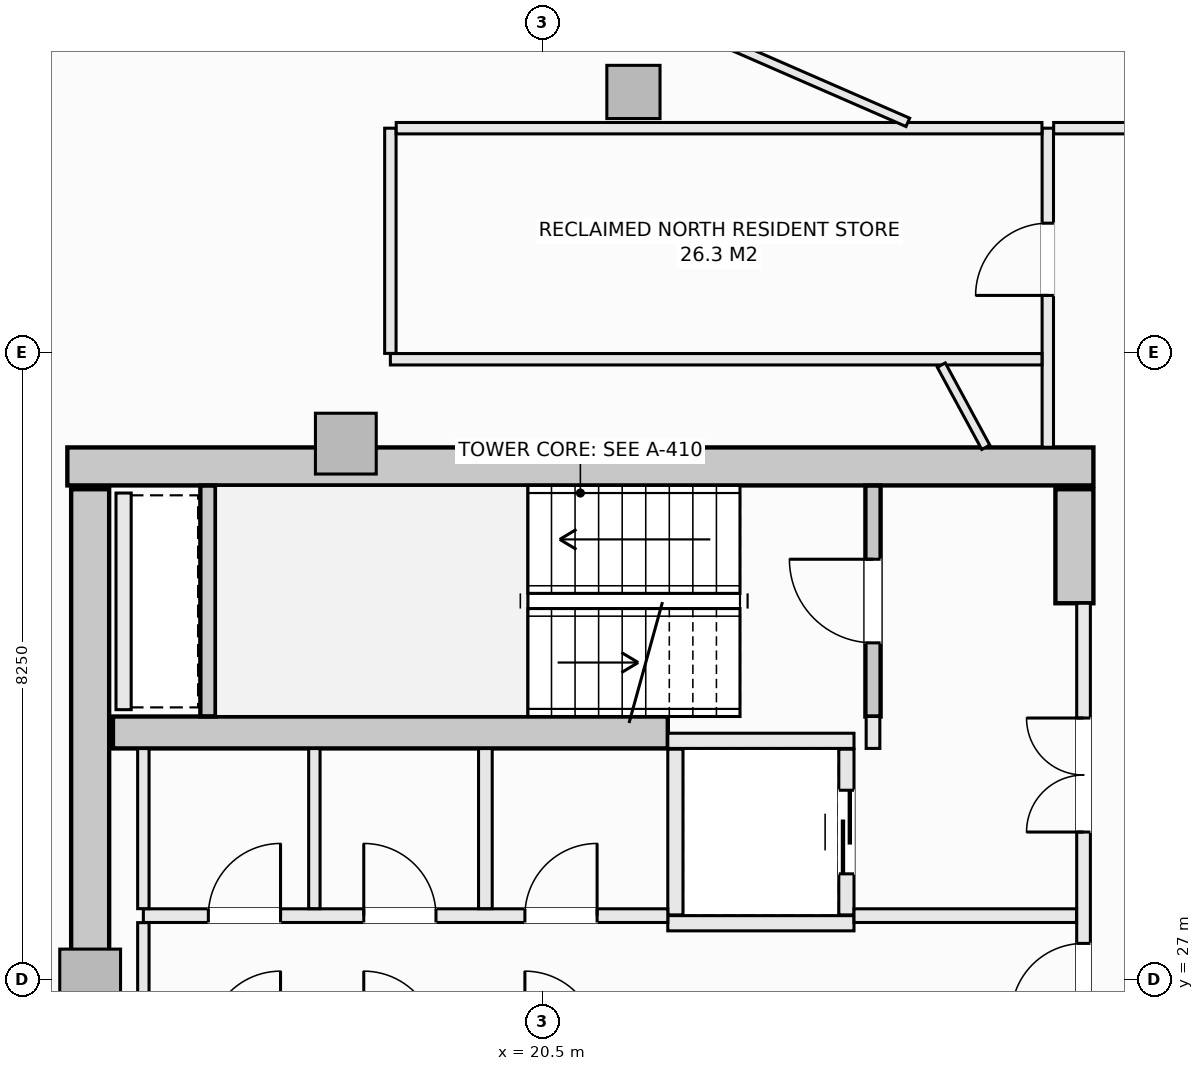
"""IFC4 building model, lengths in metres.
Left out: names, types, materials, properties, quantities, classifications, styles, units other than length and angle.
Written with IfcOpenShell. Run it as: python <this file> out.ifc"""

import sys

from ifc_helpers import new_model, si_unit, direction, frame, frame_2d, origin, origin_2d, place, context, subcontext, project, spatial, rectangle, extrude, element, fill, save


model = new_model("IFC4")
c1 = context("Model", 3, precision=1e-05, world=origin(), true_north=direction((0.0, 1.0)))
c2 = subcontext(c1, "Body", "Model", "MODEL_VIEW")
j1 = project(units=[si_unit("LENGTHUNIT", "METRE"), si_unit("PLANEANGLEUNIT", "RADIAN")], contexts=[c1])
p1 = place(None, origin())
s1 = spatial("IfcSite", under=j1, at=p1, CompositionType="ELEMENT")
p2 = place(p1, origin())
s2 = spatial("IfcBuilding", under=s1, at=p2, CompositionType="ELEMENT")
p3 = place(p2, frame((0.0, 0.0, 232.7)))
s3 = spatial("IfcBuildingStorey", under=s2, at=p3, CompositionType="ELEMENT", Elevation=232.7)
p4 = place(p3, frame((14.25, 33.75, -0.27), z_axis=(0.0, 0.0, 1.0), x_axis=(1.0, 0.0, 0.0)))
e1 = element("IfcWall", 1, at=p4, inside=s3, PredefinedType="SHEAR", context=c2, shape_type="SweptSolid", body=[
    extrude(rectangle(XDim=13.5, YDim=0.5, at=frame_2d((6.75, 0.0))), origin(), (0.0, 0.0, 1.0), 3.3),
])
p5 = place(p3, frame((14.55, 20.55, -0.27), z_axis=(0.0, 0.0, 1.0), x_axis=(0.0, 1.0, 0.0)))
e2 = element("IfcWall", 2, at=p5, inside=s3, PredefinedType="SHEAR", context=c2, shape_type="SweptSolid", body=[
    extrude(rectangle(XDim=12.9, YDim=0.5, at=frame_2d((6.45, 0.0))), origin(), (0.0, 0.0, 1.0), 3.3),
])
p6 = place(p3, frame((27.5, 31.95, -0.27), z_axis=(0.0, 0.0, 1.0), x_axis=(0.0, 1.0, 0.0)))
e3 = element("IfcWall", 3, at=p6, inside=s3, PredefinedType="SHEAR", context=c2, shape_type="SweptSolid", body=[
    extrude(rectangle(XDim=1.5, YDim=0.5, at=frame_2d((0.75, 0.0))), origin(), (0.0, 0.0, 1.0), 3.3),
])
p7 = place(p3, frame((14.85, 30.25, -0.27), z_axis=(0.0, 0.0, 1.0), x_axis=(1.0, 0.0, 0.0)))
e4 = element("IfcWall", 4, at=p7, inside=s3, PredefinedType="SHEAR", context=c2, shape_type="SweptSolid", body=[
    extrude(rectangle(XDim=7.3, YDim=0.42, at=frame_2d((3.65, 0.0))), origin(), (0.0, 0.0, 1.0), 3.3),
])
p8 = place(p3, frame((21.698, 38.677, -0.27), z_axis=(0.0, 0.0, 1.0), x_axis=(1.0, 0.0, 0.0)))
e5 = element("IfcColumn", 5, at=p8, inside=s3, PredefinedType="COLUMN", context=c2, shape_type="SweptSolid", body=[
    extrude(rectangle(XDim=0.7, YDim=0.7, at=origin_2d()), origin(), (0.0, 0.0, 1.0), 3.3),
])
for number, where, z_axis, x_axis in (
    (6, (17.914, 34.05, -0.27), (0.0, 0.0, 1.0), (1.0, 0.0, 0.0)),
    (7, (14.55, 27.0, -0.27), (0.0, 0.0, 1.0), (1.0, 0.0, 0.0)),
):
    element("IfcColumn", number, at=place(p3, frame(where, z_axis=z_axis, x_axis=x_axis)), inside=s3, PredefinedType="PILASTER", context=c2, shape_type="SweptSolid", body=[
        extrude(rectangle(XDim=0.8, YDim=0.8, at=origin_2d()), origin(), (0.0, 0.0, 1.0), 3.3),
    ])
p9 = place(p3, frame((8.691, 36.9, 0.0), z_axis=(0.0, 0.0, 1.0), x_axis=(0.901348331142, 0.433094892545, 0.0)))
e8 = element("IfcWall", 8, at=p9, inside=s3, PredefinedType="SOLIDWALL", context=c2, shape_type="SweptSolid", body=[
    extrude(rectangle(XDim=6.021, YDim=0.3, at=frame_2d((3.01, 0.0))), origin(), (0.0, 0.0, 1.0), 2.605),
])
p10 = place(p9, frame((2.11, 0.0, 0.0)))
e9 = element("IfcOpeningElement", 9, at=p10, cuts=e8, PredefinedType="OPENING", context=c2, shape_type="SweptSolid", body=[
    extrude(rectangle(XDim=1.8, YDim=2.25, at=frame_2d((0.9, 1.125))), frame((0.0, 0.16, 0.0), z_axis=(0.0, -1.0, 0.0), x_axis=(1.0, 0.0, 0.0)), (0.0, 0.0, 1.0), 0.32),
])
p11 = place(p3, frame((24.85, 30.46, -0.27), z_axis=(0.0, 0.0, 1.0), x_axis=(0.0, 1.0, 0.0)))
e10 = element("IfcWall", 10, at=p11, inside=s3, PredefinedType="SHEAR", context=c2, shape_type="SweptSolid", body=[
    extrude(rectangle(XDim=3.038, YDim=0.2, at=frame_2d((1.519, 0.0))), origin(), (0.0, 0.0, 1.0), 3.3),
])
p12 = place(p11, frame((0.969, 0.0, 0.27)))
e11 = element("IfcOpeningElement", 11, at=p12, cuts=e10, PredefinedType="OPENING", context=c2, shape_type="SweptSolid", body=[
    extrude(rectangle(XDim=1.1, YDim=2.15, at=frame_2d((0.55, 1.075))), frame((0.0, 0.11, 0.0), z_axis=(0.0, -1.0, 0.0), x_axis=(1.0, 0.0, 0.0)), (0.0, 0.0, 1.0), 0.22),
])
p13 = place(p3, frame((16.1, 30.462, -0.27), z_axis=(0.0, 0.0, 1.0), x_axis=(0.0, 1.0, 0.0)))
e12 = element("IfcWall", 12, at=p13, inside=s3, PredefinedType="SHEAR", context=c2, shape_type="SweptSolid", body=[
    extrude(rectangle(XDim=3.036, YDim=0.2, at=frame_2d((1.518, 0.0))), origin(), (0.0, 0.0, 1.0), 3.3),
])
for number, where, z_axis, x_axis in (
    (13, (22.15, 30.14, 0.0), (0.0, 0.0, 1.0), (1.0, 0.0, 0.0)),
    (14, (22.15, 27.74, 0.0), (0.0, 0.0, 1.0), (1.0, 0.0, 0.0)),
):
    element("IfcWall", number, at=place(p3, frame(where, z_axis=z_axis, x_axis=x_axis)), inside=s3, PredefinedType="SOLIDWALL", context=c2, shape_type="SweptSolid", body=[
        extrude(rectangle(XDim=2.45, YDim=0.2, at=frame_2d((1.225, 0.0))), origin(), (0.0, 0.0, 1.0), 3.03),
    ])
p14 = place(p3, frame((22.25, 27.85, 0.0), z_axis=(0.0, 0.0, 1.0), x_axis=(0.0, 1.0, 0.0)))
e15 = element("IfcWall", 15, at=p14, inside=s3, PredefinedType="SOLIDWALL", context=c2, shape_type="SweptSolid", body=[
    extrude(rectangle(XDim=2.18, YDim=0.2, at=frame_2d((1.09, 0.0))), origin(), (0.0, 0.0, 1.0), 3.03),
])
p15 = place(p3, frame((24.5, 27.85, 0.0), z_axis=(0.0, 0.0, 1.0), x_axis=(0.0, 1.0, 0.0)))
e16 = element("IfcWall", 16, at=p15, inside=s3, PredefinedType="SOLIDWALL", context=c2, shape_type="SweptSolid", body=[
    extrude(rectangle(XDim=2.18, YDim=0.2, at=frame_2d((1.09, 0.0))), origin(), (0.0, 0.0, 1.0), 3.03),
])
p16 = place(p15, frame((0.54, 0.0, 0.0)))
e17 = element("IfcOpeningElement", 17, at=p16, cuts=e16, PredefinedType="OPENING", context=c2, shape_type="SweptSolid", body=[
    extrude(rectangle(XDim=1.1, YDim=2.2, at=frame_2d((0.55, 1.1))), frame((0.0, 0.11, 0.0), z_axis=(0.0, -1.0, 0.0), x_axis=(1.0, 0.0, 0.0)), (0.0, 0.0, 1.0), 0.22),
])
p17 = place(p3, frame((14.99, 30.55, 0.0), z_axis=(0.0, 0.0, 1.0), x_axis=(0.0, 1.0, 0.0)))
e18 = element("IfcWall", 18, at=p17, inside=s3, PredefinedType="SOLIDWALL", context=c2, shape_type="SweptSolid", body=[
    extrude(rectangle(XDim=2.85, YDim=0.2, at=frame_2d((1.425, 0.0))), origin(), (0.0, 0.0, 1.0), 3.03),
])
p18 = place(p3, frame((24.85, 30.04, 0.0), z_axis=(0.0, 0.0, 1.0), x_axis=(0.0, 1.0, 0.0)))
e19 = element("IfcWall", 19, at=p18, inside=s3, PredefinedType="SOLIDWALL", context=c2, shape_type="SweptSolid", body=[
    extrude(rectangle(XDim=0.42, YDim=0.18, at=frame_2d((0.21, 0.0))), origin(), (0.0, 0.0, 1.0), 3.03),
])
p19 = place(p3, frame((27.62, 22.05, 0.0), z_axis=(0.0, 0.0, 1.0), x_axis=(0.0, 1.0, 0.0)))
e20 = element("IfcWall", 20, at=p19, inside=s3, PredefinedType="SOLIDWALL", context=c2, shape_type="SweptSolid", body=[
    extrude(rectangle(XDim=9.9, YDim=0.18, at=frame_2d((4.95, 0.0))), origin(), (0.0, 0.0, 1.0), 3.03),
])
p20 = place(p19, frame((4.475, 0.0, 0.0)))
e21 = element("IfcOpeningElement", 21, at=p20, cuts=e20, PredefinedType="OPENING", context=c2, shape_type="SweptSolid", body=[
    extrude(rectangle(XDim=0.95, YDim=2.1, at=frame_2d((0.475, 1.05))), frame((0.0, 0.1, 0.0), z_axis=(0.0, -1.0, 0.0), x_axis=(1.0, 0.0, 0.0)), (0.0, 0.0, 1.0), 0.2),
])
p21 = place(p19, frame((6.89, 0.0, 0.0)))
e22 = element("IfcOpeningElement", 22, at=p21, cuts=e20, PredefinedType="OPENING", context=c2, shape_type="SweptSolid", body=[
    extrude(rectangle(XDim=1.5, YDim=2.2, at=frame_2d((0.75, 1.1))), frame((0.0, 0.1, 0.0), z_axis=(0.0, -1.0, 0.0), x_axis=(1.0, 0.0, 0.0)), (0.0, 0.0, 1.0), 0.2),
])
p22 = place(p19, frame((1.51, 0.0, 0.0)))
e23 = element("IfcOpeningElement", 23, at=p22, cuts=e20, PredefinedType="OPENING", context=c2, shape_type="SweptSolid", body=[
    extrude(rectangle(XDim=1.5, YDim=2.2, at=frame_2d((0.75, 1.1))), frame((0.0, 0.1, 0.0), z_axis=(0.0, -1.0, 0.0), x_axis=(1.0, 0.0, 0.0)), (0.0, 0.0, 1.0), 0.2),
])
p23 = place(p3, frame((15.25, 27.84, 0.0), z_axis=(0.0, 0.0, 1.0), x_axis=(1.0, 0.0, 0.0)))
e24 = element("IfcWall", 24, at=p23, inside=s3, PredefinedType="SOLIDWALL", context=c2, shape_type="SweptSolid", body=[
    extrude(rectangle(XDim=6.9, YDim=0.18, at=frame_2d((3.45, 0.0))), origin(), (0.0, 0.0, 1.0), 3.03),
])
p24 = place(p23, frame((5.02, 0.0, 0.0)))
e25 = element("IfcOpeningElement", 25, at=p24, cuts=e24, PredefinedType="OPENING", context=c2, shape_type="SweptSolid", body=[
    extrude(rectangle(XDim=0.95, YDim=2.1, at=frame_2d((0.475, 1.05))), frame((0.0, 0.1, 0.0), z_axis=(0.0, -1.0, 0.0), x_axis=(1.0, 0.0, 0.0)), (0.0, 0.0, 1.0), 0.2),
])
p25 = place(p23, frame((0.855, 0.0, 0.0)))
e26 = element("IfcOpeningElement", 26, at=p25, cuts=e24, PredefinedType="OPENING", context=c2, shape_type="SweptSolid", body=[
    extrude(rectangle(XDim=0.95, YDim=2.1, at=frame_2d((0.475, 1.05))), frame((0.0, 0.1, 0.0), z_axis=(0.0, -1.0, 0.0), x_axis=(1.0, 0.0, 0.0)), (0.0, 0.0, 1.0), 0.2),
])
p26 = place(p23, frame((2.9, 0.0, 0.0)))
e27 = element("IfcOpeningElement", 27, at=p26, cuts=e24, PredefinedType="OPENING", context=c2, shape_type="SweptSolid", body=[
    extrude(rectangle(XDim=0.95, YDim=2.1, at=frame_2d((0.475, 1.05))), frame((0.0, 0.1, 0.0), z_axis=(0.0, -1.0, 0.0), x_axis=(1.0, 0.0, 0.0)), (0.0, 0.0, 1.0), 0.2),
])
p27 = place(p3, frame((24.6, 27.84, 0.0), z_axis=(0.0, 0.0, 1.0), x_axis=(1.0, 0.0, 0.0)))
e28 = element("IfcWall", 28, at=p27, inside=s3, PredefinedType="SOLIDWALL", context=c2, shape_type="SweptSolid", body=[
    extrude(rectangle(XDim=2.928, YDim=0.18, at=frame_2d((1.464, 0.0))), origin(), (0.0, 0.0, 1.0), 3.03),
])
p28 = place(p3, frame((15.25, 26.252, 0.0), z_axis=(0.0, 0.0, 1.0), x_axis=(0.0, 1.0, 0.0)))
e29 = element("IfcWall", 29, at=p28, inside=s3, PredefinedType="PARTITIONING", context=c2, shape_type="SweptSolid", body=[
    extrude(rectangle(XDim=1.496, YDim=0.15, at=frame_2d((0.748, 0.0))), origin(), (0.0, 0.0, 1.0), 3.03),
])
p29 = place(p3, frame((15.25, 27.932, 0.0), z_axis=(0.0, 0.0, 1.0), x_axis=(0.0, 1.0, 0.0)))
e30 = element("IfcWall", 30, at=p29, inside=s3, PredefinedType="PARTITIONING", context=c2, shape_type="SweptSolid", body=[
    extrude(rectangle(XDim=2.106, YDim=0.15, at=frame_2d((1.053, 0.0))), origin(), (0.0, 0.0, 1.0), 3.03),
])
p30 = place(p3, frame((19.75, 27.932, 0.0), z_axis=(0.0, 0.0, 1.0), x_axis=(0.0, 1.0, 0.0)))
e31 = element("IfcWall", 31, at=p30, inside=s3, PredefinedType="SOLIDWALL", context=c2, shape_type="SweptSolid", body=[
    extrude(rectangle(XDim=2.106, YDim=0.18, at=frame_2d((1.053, 0.0))), origin(), (0.0, 0.0, 1.0), 3.03),
])
p31 = place(p3, frame((17.5, 27.932, 0.0), z_axis=(0.0, 0.0, 1.0), x_axis=(0.0, 1.0, 0.0)))
e32 = element("IfcWall", 32, at=p31, inside=s3, PredefinedType="PARTITIONING", context=c2, shape_type="SweptSolid", body=[
    extrude(rectangle(XDim=2.106, YDim=0.15, at=frame_2d((1.053, 0.0))), origin(), (0.0, 0.0, 1.0), 3.03),
])
p32 = place(p3, frame((27.15, 34.002, 0.0), z_axis=(0.0, 0.0, 1.0), x_axis=(0.0, 1.0, 0.0)))
e33 = element("IfcWall", 33, at=p32, inside=s3, PredefinedType="PARTITIONING", context=c2, shape_type="SweptSolid", body=[
    extrude(rectangle(XDim=4.198, YDim=0.15, at=frame_2d((2.099, 0.0))), origin(), (0.0, 0.0, 1.0), 3.03),
])
p33 = place(p32, frame((1.998, 0.0, 0.0)))
e34 = element("IfcOpeningElement", 34, at=p33, cuts=e33, PredefinedType="OPENING", context=c2, shape_type="SweptSolid", body=[
    extrude(rectangle(XDim=0.95, YDim=2.1, at=frame_2d((0.475, 1.05))), frame((0.0, 0.085, 0.0), z_axis=(0.0, -1.0, 0.0), x_axis=(1.0, 0.0, 0.0)), (0.0, 0.0, 1.0), 0.17),
])
p34 = place(p3, frame((18.5, 35.16, 0.0), z_axis=(0.0, 0.0, 1.0), x_axis=(1.0, 0.0, 0.0)))
e35 = element("IfcWall", 35, at=p34, inside=s3, PredefinedType="PARTITIONING", context=c2, shape_type="SweptSolid", body=[
    extrude(rectangle(XDim=8.573, YDim=0.15, at=frame_2d((4.287, 0.0))), origin(), (0.0, 0.0, 1.0), 3.03),
])
p35 = place(p3, frame((18.5, 35.237, 0.0), z_axis=(0.0, 0.0, 1.0), x_axis=(0.0, 1.0, 0.0)))
e36 = element("IfcWall", 36, at=p35, inside=s3, PredefinedType="PARTITIONING", context=c2, shape_type="SweptSolid", body=[
    extrude(rectangle(XDim=2.963, YDim=0.15, at=frame_2d((1.481, 0.0))), origin(), (0.0, 0.0, 1.0), 3.03),
])
p36 = place(p3, frame((18.577, 38.2, 0.0), z_axis=(0.0, 0.0, 1.0), x_axis=(1.0, 0.0, 0.0)))
e37 = element("IfcWall", 37, at=p36, inside=s3, PredefinedType="PARTITIONING", context=c2, shape_type="SweptSolid", body=[
    extrude(rectangle(XDim=8.496, YDim=0.15, at=frame_2d((4.248, 0.0))), origin(), (0.0, 0.0, 1.0), 3.03),
])
p37 = place(p3, frame((27.227, 38.2, 0.0), z_axis=(0.0, 0.0, 1.0), x_axis=(1.0, 0.0, 0.0)))
e38 = element("IfcWall", 38, at=p37, inside=s3, PredefinedType="PARTITIONING", context=c2, shape_type="SweptSolid", body=[
    extrude(rectangle(XDim=2.711, YDim=0.15, at=frame_2d((1.355, 0.0))), origin(), (0.0, 0.0, 1.0), 3.03),
])
p38 = place(p3, frame((16.392, 42.166, 0.0), z_axis=(0.0, 0.0, 1.0), x_axis=(0.916624998673, -0.399748185496, 0.0)))
e39 = element("IfcWall", 39, at=p38, inside=s3, PredefinedType="PARTITIONING", context=c2, shape_type="SweptSolid", body=[
    extrude(rectangle(XDim=9.728, YDim=0.12, at=frame_2d((4.864, 0.0))), origin(), (0.0, 0.0, 1.0), 2.478),
])
p39 = place(p3, frame((25.749, 35.083, 0.0), z_axis=(0.0, 0.0, 1.0), x_axis=(0.476052805352, -0.879416696746, 0.0)))
e40 = element("IfcWall", 40, at=p39, inside=s3, PredefinedType="PARTITIONING", context=c2, shape_type="SweptSolid", body=[
    extrude(rectangle(XDim=1.229, YDim=0.12, at=frame_2d((0.615, 0.0))), origin(), (0.0, 0.0, 1.0), 3.03),
])
p40 = place(p12, origin())
e41 = element("IfcDoor", 41, at=p40, inside=s3, OperationType="SINGLE_SWING_RIGHT", PredefinedType="DOOR", context=c2, shape_type="SweptSolid", body=[
    extrude(rectangle(XDim=1.1, YDim=2.15, at=frame_2d((0.55, 1.075))), frame((0.0, 0.025, 0.0), z_axis=(0.0, -1.0, 0.0), x_axis=(1.0, 0.0, 0.0)), (0.0, 0.0, 1.0), 0.05),
])
fill(e11, e41)
p41 = place(p16, origin())
e42 = element("IfcDoor", 42, at=p41, inside=s3, OperationType="SLIDING_TO_LEFT", PredefinedType="DOOR", context=c2, shape_type="SweptSolid", body=[
    extrude(rectangle(XDim=1.1, YDim=2.2, at=frame_2d((0.55, 1.1))), frame((0.0, 0.025, 0.0), z_axis=(0.0, -1.0, 0.0), x_axis=(1.0, 0.0, 0.0)), (0.0, 0.0, 1.0), 0.05),
])
fill(e17, e42)
p42 = place(p20, origin())
e43 = element("IfcDoor", 43, at=p42, inside=s3, OperationType="SINGLE_SWING_LEFT", PredefinedType="DOOR", context=c2, shape_type="SweptSolid", body=[
    extrude(rectangle(XDim=0.95, YDim=2.1, at=frame_2d((0.475, 1.05))), frame((0.0, 0.025, 0.0), z_axis=(0.0, -1.0, 0.0), x_axis=(1.0, 0.0, 0.0)), (0.0, 0.0, 1.0), 0.05),
])
fill(e21, e43)
p43 = place(p21, origin())
e44 = element("IfcDoor", 44, at=p43, inside=s3, OperationType="DOUBLE_DOOR_SINGLE_SWING", PredefinedType="DOOR", context=c2, shape_type="SweptSolid", body=[
    extrude(rectangle(XDim=1.5, YDim=2.2, at=frame_2d((0.75, 1.1))), frame((0.0, 0.025, 0.0), z_axis=(0.0, -1.0, 0.0), x_axis=(1.0, 0.0, 0.0)), (0.0, 0.0, 1.0), 0.05),
])
fill(e22, e44)
p44 = place(p24, origin())
e45 = element("IfcDoor", 45, at=p44, inside=s3, OperationType="SINGLE_SWING_RIGHT", PredefinedType="DOOR", context=c2, shape_type="SweptSolid", body=[
    extrude(rectangle(XDim=0.95, YDim=2.1, at=frame_2d((0.475, 1.05))), frame((0.0, 0.025, 0.0), z_axis=(0.0, -1.0, 0.0), x_axis=(1.0, 0.0, 0.0)), (0.0, 0.0, 1.0), 0.05),
])
fill(e25, e45)
p45 = place(p25, origin())
e46 = element("IfcDoor", 46, at=p45, inside=s3, OperationType="SINGLE_SWING_RIGHT", PredefinedType="DOOR", context=c2, shape_type="SweptSolid", body=[
    extrude(rectangle(XDim=0.95, YDim=2.1, at=frame_2d((0.475, 1.05))), frame((0.0, 0.025, 0.0), z_axis=(0.0, -1.0, 0.0), x_axis=(1.0, 0.0, 0.0)), (0.0, 0.0, 1.0), 0.05),
])
fill(e26, e46)
p46 = place(p26, origin())
e47 = element("IfcDoor", 47, at=p46, inside=s3, OperationType="SINGLE_SWING_LEFT", PredefinedType="DOOR", context=c2, shape_type="SweptSolid", body=[
    extrude(rectangle(XDim=0.95, YDim=2.1, at=frame_2d((0.475, 1.05))), frame((0.0, 0.025, 0.0), z_axis=(0.0, -1.0, 0.0), x_axis=(1.0, 0.0, 0.0)), (0.0, 0.0, 1.0), 0.05),
])
fill(e27, e47)
p47 = place(p33, origin())
e48 = element("IfcDoor", 48, at=p47, inside=s3, OperationType="SINGLE_SWING_LEFT", PredefinedType="DOOR", context=c2, shape_type="SweptSolid", body=[
    extrude(rectangle(XDim=0.95, YDim=2.1, at=frame_2d((0.475, 1.05))), frame((0.0, 0.025, 0.0), z_axis=(0.0, -1.0, 0.0), x_axis=(1.0, 0.0, 0.0)), (0.0, 0.0, 1.0), 0.05),
])
fill(e34, e48)
save(model, sys.argv[1])
